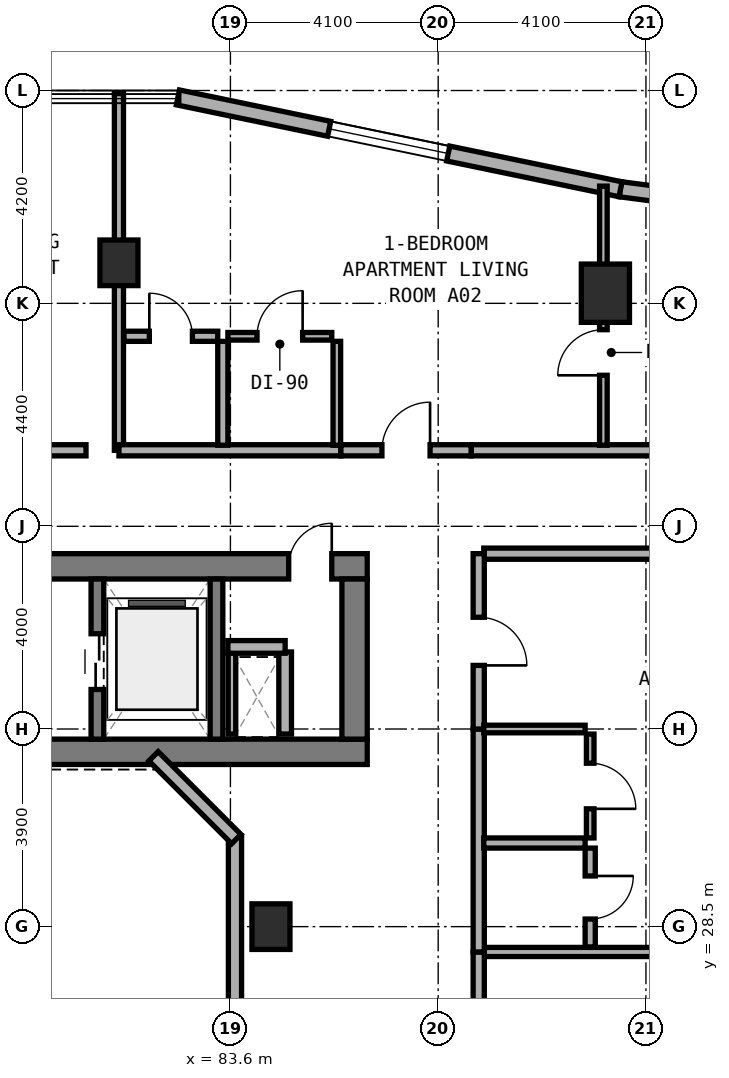
"""IFC4 building model, lengths in metres.
Left out: names, types, materials, properties, quantities, classifications, styles, units other than length and angle.
Written with IfcOpenShell. Run it as: python <this file> out.ifc"""

import sys

from ifc_helpers import new_model, si_unit, direction, frame, frame_2d, origin, origin_2d, place, context, subcontext, project, spatial, rectangle, extrude, element, fill, save


model = new_model("IFC4")
c1 = context("Model", 3, precision=1e-05, world=origin(), true_north=direction((0.0, 1.0)))
c2 = subcontext(c1, "Body", "Model", "MODEL_VIEW")
j1 = project(units=[si_unit("LENGTHUNIT", "METRE"), si_unit("PLANEANGLEUNIT", "RADIAN")], contexts=[c1])
p1 = place(None, origin())
s1 = spatial("IfcSite", under=j1, at=p1, CompositionType="ELEMENT")
p2 = place(p1, origin())
s2 = spatial("IfcBuilding", under=s1, at=p2, CompositionType="ELEMENT")
p3 = place(p2, frame((0.0, 0.0, 62.5)))
s3 = spatial("IfcBuildingStorey", under=s2, at=p3, CompositionType="ELEMENT", Elevation=62.5)
p4 = place(p3, frame((67.9, 31.95, 0.0), z_axis=(0.0, 0.0, 1.0), x_axis=(1.0, 0.0, 0.0)))
e1 = element("IfcWall", 1, at=p4, inside=s3, PredefinedType="SHEAR", context=c2, shape_type="SweptSolid", body=[
    extrude(rectangle(XDim=18.4, YDim=0.5, at=frame_2d((9.2, 0.0))), origin(), (0.0, 0.0, 1.0), 3.5),
])
p5 = place(p3, frame((67.9, 35.61, 0.0), z_axis=(0.0, 0.0, 1.0), x_axis=(1.0, 0.0, 0.0)))
e2 = element("IfcWall", 2, at=p5, inside=s3, PredefinedType="SHEAR", context=c2, shape_type="SweptSolid", body=[
    extrude(rectangle(XDim=18.4, YDim=0.5, at=frame_2d((9.2, 0.0))), origin(), (0.0, 0.0, 1.0), 3.5),
])
p6 = place(p5, frame((9.25, 0.0, 0.0)))
e3 = element("IfcOpeningElement", 3, at=p6, cuts=e2, PredefinedType="OPENING", context=c2, shape_type="SweptSolid", body=[
    extrude(rectangle(XDim=1.2, YDim=2.15, at=frame_2d((0.6, 1.075))), frame((0.0, 0.26, 0.0), z_axis=(0.0, -1.0, 0.0), x_axis=(1.0, 0.0, 0.0)), (0.0, 0.0, 1.0), 0.52),
])
p7 = place(p5, frame((16.85, 0.0, 0.0)))
e4 = element("IfcOpeningElement", 4, at=p7, cuts=e2, PredefinedType="OPENING", context=c2, shape_type="SweptSolid", body=[
    extrude(rectangle(XDim=0.85, YDim=2.1, at=frame_2d((0.425, 1.05))), frame((0.0, 0.26, 0.0), z_axis=(0.0, -1.0, 0.0), x_axis=(1.0, 0.0, 0.0)), (0.0, 0.0, 1.0), 0.52),
])
p8 = place(p3, frame((86.05, 32.2, 0.0), z_axis=(0.0, 0.0, 1.0), x_axis=(0.0, 1.0, 0.0)))
e5 = element("IfcWall", 5, at=p8, inside=s3, PredefinedType="SHEAR", context=c2, shape_type="SweptSolid", body=[
    extrude(rectangle(XDim=3.16, YDim=0.5, at=frame_2d((1.58, 0.0))), origin(), (0.0, 0.0, 1.0), 3.5),
])
p9 = place(p3, frame((80.975, 32.2, 0.0), z_axis=(0.0, 0.0, 1.0), x_axis=(0.0, 1.0, 0.0)))
e6 = element("IfcWall", 6, at=p9, inside=s3, PredefinedType="STANDARD", context=c2, shape_type="SweptSolid", body=[
    extrude(rectangle(XDim=3.16, YDim=0.25, at=frame_2d((1.58, 0.0))), origin(), (0.0, 0.0, 1.0), 3.25),
])
p10 = place(p9, frame((0.98, 0.0, 0.0)))
e7 = element("IfcOpeningElement", 7, at=p10, cuts=e6, PredefinedType="OPENING", context=c2, shape_type="SweptSolid", body=[
    extrude(rectangle(XDim=1.1, YDim=2.15, at=frame_2d((0.55, 1.075))), frame((0.0, 0.135, 0.0), z_axis=(0.0, -1.0, 0.0), x_axis=(1.0, 0.0, 0.0)), (0.0, 0.0, 1.0), 0.27),
])
p11 = place(p3, frame((83.325, 32.2, 0.0), z_axis=(0.0, 0.0, 1.0), x_axis=(0.0, 1.0, 0.0)))
e8 = element("IfcWall", 8, at=p11, inside=s3, PredefinedType="STANDARD", context=c2, shape_type="SweptSolid", body=[
    extrude(rectangle(XDim=3.16, YDim=0.25, at=frame_2d((1.58, 0.0))), origin(), (0.0, 0.0, 1.0), 3.25),
])
p12 = place(p3, frame((81.4, 41.6, 0.0), z_axis=(0.0, 0.0, 1.0), x_axis=(1.0, 0.0, 0.0)))
e9 = element("IfcColumn", 9, at=p12, inside=s3, PredefinedType="COLUMN", context=c2, shape_type="SweptSolid", body=[
    extrude(rectangle(XDim=0.75, YDim=0.9, at=origin_2d()), origin(), (0.0, 0.0, 1.0), 3.5),
])
p13 = place(p3, frame((91.0, 41.0, 0.0), z_axis=(0.0, 0.0, 1.0), x_axis=(1.0, 0.0, 0.0)))
e10 = element("IfcColumn", 10, at=p13, inside=s3, PredefinedType="COLUMN", context=c2, shape_type="SweptSolid", body=[
    extrude(rectangle(XDim=0.95, YDim=1.15, at=origin_2d()), origin(), (0.0, 0.0, 1.0), 3.5),
])
p14 = place(p3, frame((84.4, 28.5, 0.0), z_axis=(0.0, 0.0, 1.0), x_axis=(1.0, 0.0, 0.0)))
e11 = element("IfcColumn", 11, at=p14, inside=s3, PredefinedType="COLUMN", context=c2, shape_type="SweptSolid", body=[
    extrude(rectangle(XDim=0.75, YDim=0.9, at=origin_2d()), origin(), (0.0, 0.0, 1.0), 3.5),
])
p15 = place(p3, frame((92.051, 42.953, 0.0), z_axis=(0.0, 0.0, 1.0), x_axis=(-0.991559404866, 0.129653178221, 0.0)))
e12 = element("IfcWall", 12, at=p15, inside=s3, PredefinedType="STANDARD", context=c2, shape_type="SweptSolid", body=[
    extrude(rectangle(XDim=0.764, YDim=0.3, at=frame_2d((0.382, 0.0))), origin(), (0.0, 0.0, 1.0), 3.25),
])
p16 = place(p3, frame((91.298, 43.051, 0.0), z_axis=(0.0, 0.0, 1.0), x_axis=(-0.979128391325, 0.203242695569, 0.0)))
e13 = element("IfcWall", 13, at=p16, inside=s3, PredefinedType="STANDARD", context=c2, shape_type="SweptSolid", body=[
    extrude(rectangle(XDim=8.92, YDim=0.3, at=frame_2d((4.46, 0.0))), origin(), (0.0, 0.0, 1.0), 3.25),
])
p17 = place(p16, frame((3.472, 0.0, 0.8)))
e14 = element("IfcOpeningElement", 14, at=p17, cuts=e13, PredefinedType="OPENING", context=c2, shape_type="SweptSolid", body=[
    extrude(rectangle(XDim=2.4, YDim=1.6, at=frame_2d((1.2, 0.8))), frame((0.0, 0.16, 0.0), z_axis=(0.0, -1.0, 0.0), x_axis=(1.0, 0.0, 0.0)), (0.0, 0.0, 1.0), 0.32),
])
p18 = place(p3, frame((83.69, 19.71, 0.0), z_axis=(0.0, 0.0, 1.0), x_axis=(0.0, 1.0, 0.0)))
e15 = element("IfcWall", 15, at=p18, inside=s3, PredefinedType="STANDARD", context=c2, shape_type="SweptSolid", body=[
    extrude(rectangle(XDim=10.58, YDim=0.26, at=frame_2d((5.29, 0.0))), origin(), (0.0, 0.0, 1.0), 3.25),
])
p19 = place(p18, frame((4.39, 0.0, 0.85)))
e16 = element("IfcOpeningElement", 16, at=p19, cuts=e15, PredefinedType="OPENING", context=c2, shape_type="SweptSolid", body=[
    extrude(rectangle(XDim=1.8, YDim=1.5, at=frame_2d((0.9, 0.75))), frame((0.0, 0.14, 0.0), z_axis=(0.0, -1.0, 0.0), x_axis=(1.0, 0.0, 0.0)), (0.0, 0.0, 1.0), 0.28),
])
p20 = place(p3, frame((83.716, 30.228, 0.0), z_axis=(0.0, 0.0, 1.0), x_axis=(-0.707106781187, 0.707106781187, 0.0)))
e17 = element("IfcWall", 17, at=p20, inside=s3, PredefinedType="STANDARD", context=c2, shape_type="SweptSolid", body=[
    extrude(rectangle(XDim=2.311, YDim=0.26, at=frame_2d((1.155, 0.0))), origin(), (0.0, 0.0, 1.0), 3.25),
])
p21 = place(p3, frame((83.63, 32.3, 0.0), z_axis=(0.0, 0.0, 1.0), x_axis=(0.0, 1.0, 0.0)))
e18 = element("IfcWall", 18, at=p21, inside=s3, PredefinedType="PARTITIONING", context=c2, shape_type="SweptSolid", body=[
    extrude(rectangle(XDim=1.62, YDim=0.15, at=frame_2d((0.81, 0.0))), origin(), (0.0, 0.0, 1.0), 2.725),
])
p22 = place(p3, frame((84.68, 32.3, 0.0), z_axis=(0.0, 0.0, 1.0), x_axis=(0.0, 1.0, 0.0)))
e19 = element("IfcWall", 19, at=p22, inside=s3, PredefinedType="SOLIDWALL", context=c2, shape_type="SweptSolid", body=[
    extrude(rectangle(XDim=1.62, YDim=0.25, at=frame_2d((0.81, 0.0))), origin(), (0.0, 0.0, 1.0), 3.22),
])
p23 = place(p3, frame((83.55, 34.02, 0.0), z_axis=(0.0, 0.0, 1.0), x_axis=(1.0, 0.0, 0.0)))
e20 = element("IfcWall", 20, at=p23, inside=s3, PredefinedType="SOLIDWALL", context=c2, shape_type="SweptSolid", body=[
    extrude(rectangle(XDim=1.13, YDim=0.25, at=frame_2d((0.565, 0.0))), origin(), (0.0, 0.0, 1.0), 3.22),
])
p24 = place(p3, frame((77.45, 37.9, 0.0), z_axis=(0.0, 0.0, 1.0), x_axis=(1.0, 0.0, 0.0)))
e21 = element("IfcWall", 21, at=p24, inside=s3, PredefinedType="SOLIDWALL", context=c2, shape_type="SweptSolid", body=[
    extrude(rectangle(XDim=3.3, YDim=0.22, at=frame_2d((1.65, 0.0))), origin(), (0.0, 0.0, 1.0), 3.22),
])
p25 = place(p24, frame((0.98, 0.0, 0.0)))
e22 = element("IfcOpeningElement", 22, at=p25, cuts=e21, PredefinedType="OPENING", context=c2, shape_type="SweptSolid", body=[
    extrude(rectangle(XDim=1.1, YDim=2.1, at=frame_2d((0.55, 1.05))), frame((0.0, 0.12, 0.0), z_axis=(0.0, -1.0, 0.0), x_axis=(1.0, 0.0, 0.0)), (0.0, 0.0, 1.0), 0.24),
])
p26 = place(p3, frame((81.4, 37.9, 0.0), z_axis=(0.0, 0.0, 1.0), x_axis=(0.0, 1.0, 0.0)))
e23 = element("IfcWall", 23, at=p26, inside=s3, PredefinedType="SOLIDWALL", context=c2, shape_type="SweptSolid", body=[
    extrude(rectangle(XDim=7.04, YDim=0.18, at=frame_2d((3.52, 0.0))), origin(), (0.0, 0.0, 1.0), 2.725),
])
p27 = place(p3, frame((81.4, 37.9, 0.0), z_axis=(0.0, 0.0, 1.0), x_axis=(1.0, 0.0, 0.0)))
e24 = element("IfcWall", 24, at=p27, inside=s3, PredefinedType="SOLIDWALL", context=c2, shape_type="SweptSolid", body=[
    extrude(rectangle(XDim=4.38, YDim=0.22, at=frame_2d((2.19, 0.0))), origin(), (0.0, 0.0, 1.0), 2.725),
])
p28 = place(p3, frame((88.35, 37.9, 0.0), z_axis=(0.0, 0.0, 1.0), x_axis=(1.0, 0.0, 0.0)))
e25 = element("IfcWall", 25, at=p28, inside=s3, PredefinedType="SOLIDWALL", context=c2, shape_type="SweptSolid", body=[
    extrude(rectangle(XDim=7.41, YDim=0.22, at=frame_2d((3.705, 0.0))), origin(), (0.0, 0.0, 1.0), 2.865),
])
p29 = place(p3, frame((85.78, 37.9, 0.0), z_axis=(0.0, 0.0, 1.0), x_axis=(1.0, 0.0, 0.0)))
e26 = element("IfcWall", 26, at=p29, inside=s3, PredefinedType="SOLIDWALL", context=c2, shape_type="SweptSolid", body=[
    extrude(rectangle(XDim=2.57, YDim=0.22, at=frame_2d((1.285, 0.0))), origin(), (0.0, 0.0, 1.0), 3.22),
])
p30 = place(p29, frame((0.81, 0.0, 0.0)))
e27 = element("IfcOpeningElement", 27, at=p30, cuts=e26, PredefinedType="OPENING", context=c2, shape_type="SweptSolid", body=[
    extrude(rectangle(XDim=0.95, YDim=2.1, at=frame_2d((0.475, 1.05))), frame((0.0, 0.12, 0.0), z_axis=(0.0, -1.0, 0.0), x_axis=(1.0, 0.0, 0.0)), (0.0, 0.0, 1.0), 0.24),
])
p31 = place(p3, frame((90.96, 38.0, 0.0), z_axis=(0.0, 0.0, 1.0), x_axis=(0.0, 1.0, 0.0)))
e28 = element("IfcWall", 28, at=p31, inside=s3, PredefinedType="PARTITIONING", context=c2, shape_type="SweptSolid", body=[
    extrude(rectangle(XDim=5.113, YDim=0.15, at=frame_2d((2.557, 0.0))), origin(), (0.0, 0.0, 1.0), 2.865),
])
p32 = place(p31, frame((1.38, 0.0, 0.0)))
e29 = element("IfcOpeningElement", 29, at=p32, cuts=e28, PredefinedType="OPENING", context=c2, shape_type="SweptSolid", body=[
    extrude(rectangle(XDim=0.9, YDim=2.1, at=frame_2d((0.45, 1.05))), frame((0.0, 0.085, 0.0), z_axis=(0.0, -1.0, 0.0), x_axis=(1.0, 0.0, 0.0)), (0.0, 0.0, 1.0), 0.17),
])
p33 = place(p3, frame((83.45, 38.0, 0.0), z_axis=(0.0, 0.0, 1.0), x_axis=(0.0, 1.0, 0.0)))
e30 = element("IfcWall", 30, at=p33, inside=s3, PredefinedType="PLUMBINGWALL", context=c2, shape_type="SweptSolid", body=[
    extrude(rectangle(XDim=2.05, YDim=0.2, at=frame_2d((1.025, 0.0))), origin(), (0.0, 0.0, 1.0), 3.22),
])
p34 = place(p3, frame((85.7, 38.0, 0.0), z_axis=(0.0, 0.0, 1.0), x_axis=(0.0, 1.0, 0.0)))
e31 = element("IfcWall", 31, at=p34, inside=s3, PredefinedType="PARTITIONING", context=c2, shape_type="SweptSolid", body=[
    extrude(rectangle(XDim=2.05, YDim=0.15, at=frame_2d((1.025, 0.0))), origin(), (0.0, 0.0, 1.0), 3.22),
])
p35 = place(p3, frame((81.5, 40.15, 0.0), z_axis=(0.0, 0.0, 1.0), x_axis=(1.0, 0.0, 0.0)))
e32 = element("IfcWall", 32, at=p35, inside=s3, PredefinedType="PLUMBINGWALL", context=c2, shape_type="SweptSolid", body=[
    extrude(rectangle(XDim=1.85, YDim=0.2, at=frame_2d((0.925, 0.0))), origin(), (0.0, 0.0, 1.0), 2.725),
])
p36 = place(p35, frame((0.5, 0.0, 0.0)))
e33 = element("IfcOpeningElement", 33, at=p36, cuts=e32, PredefinedType="OPENING", context=c2, shape_type="SweptSolid", body=[
    extrude(rectangle(XDim=0.85, YDim=2.1, at=frame_2d((0.425, 1.05))), frame((0.0, 0.11, 0.0), z_axis=(0.0, -1.0, 0.0), x_axis=(1.0, 0.0, 0.0)), (0.0, 0.0, 1.0), 0.22),
])
p37 = place(p3, frame((83.55, 40.15, 0.0), z_axis=(0.0, 0.0, 1.0), x_axis=(1.0, 0.0, 0.0)))
e34 = element("IfcWall", 34, at=p37, inside=s3, PredefinedType="PARTITIONING", context=c2, shape_type="SweptSolid", body=[
    extrude(rectangle(XDim=2.05, YDim=0.15, at=frame_2d((1.025, 0.0))), origin(), (0.0, 0.0, 1.0), 3.22),
])
p38 = place(p37, frame((0.575, 0.0, 0.0)))
e35 = element("IfcOpeningElement", 35, at=p38, cuts=e34, PredefinedType="OPENING", context=c2, shape_type="SweptSolid", body=[
    extrude(rectangle(XDim=0.9, YDim=2.1, at=frame_2d((0.45, 1.05))), frame((0.0, 0.085, 0.0), z_axis=(0.0, -1.0, 0.0), x_axis=(1.0, 0.0, 0.0)), (0.0, 0.0, 1.0), 0.17),
])
p39 = place(p3, frame((88.6, 35.86, 0.0), z_axis=(0.0, 0.0, 1.0), x_axis=(1.0, 0.0, 0.0)))
e36 = element("IfcWall", 36, at=p39, inside=s3, PredefinedType="SOLIDWALL", context=c2, shape_type="SweptSolid", body=[
    extrude(rectangle(XDim=7.0, YDim=0.22, at=frame_2d((3.5, 0.0))), origin(), (0.0, 0.0, 1.0), 2.865),
])
p40 = place(p3, frame((88.5, 28.0, 0.0), z_axis=(0.0, 0.0, 1.0), x_axis=(1.0, 0.0, 0.0)))
e37 = element("IfcWall", 37, at=p40, inside=s3, PredefinedType="SOLIDWALL", context=c2, shape_type="SweptSolid", body=[
    extrude(rectangle(XDim=7.36, YDim=0.18, at=frame_2d((3.68, 0.0))), origin(), (0.0, 0.0, 1.0), 2.865),
])
p41 = place(p3, frame((88.5, 18.54, 0.0), z_axis=(0.0, 0.0, 1.0), x_axis=(0.0, 1.0, 0.0)))
e38 = element("IfcWall", 38, at=p41, inside=s3, PredefinedType="SOLIDWALL", context=c2, shape_type="SweptSolid", body=[
    extrude(rectangle(XDim=9.46, YDim=0.22, at=frame_2d((4.73, 0.0))), origin(), (0.0, 0.0, 1.0), 2.725),
])
p42 = place(p41, frame((2.355, 0.0, 0.0)))
e39 = element("IfcOpeningElement", 39, at=p42, cuts=e38, PredefinedType="OPENING", context=c2, shape_type="SweptSolid", body=[
    extrude(rectangle(XDim=0.95, YDim=2.1, at=frame_2d((0.475, 1.05))), frame((0.0, 0.12, 0.0), z_axis=(0.0, -1.0, 0.0), x_axis=(1.0, 0.0, 0.0)), (0.0, 0.0, 1.0), 0.24),
])
p43 = place(p3, frame((88.5, 28.0, 0.0), z_axis=(0.0, 0.0, 1.0), x_axis=(0.0, 1.0, 0.0)))
e40 = element("IfcWall", 40, at=p43, inside=s3, PredefinedType="SOLIDWALL", context=c2, shape_type="SweptSolid", body=[
    extrude(rectangle(XDim=4.4, YDim=0.22, at=frame_2d((2.2, 0.0))), origin(), (0.0, 0.0, 1.0), 2.725),
])
p44 = place(p3, frame((88.5, 32.4, 0.0), z_axis=(0.0, 0.0, 1.0), x_axis=(0.0, 1.0, 0.0)))
e41 = element("IfcWall", 41, at=p44, inside=s3, PredefinedType="SOLIDWALL", context=c2, shape_type="SweptSolid", body=[
    extrude(rectangle(XDim=3.46, YDim=0.22, at=frame_2d((1.73, 0.0))), origin(), (0.0, 0.0, 1.0), 3.22),
])
p45 = place(p44, frame((1.255, 0.0, 0.0)))
e42 = element("IfcOpeningElement", 42, at=p45, cuts=e41, PredefinedType="OPENING", context=c2, shape_type="SweptSolid", body=[
    extrude(rectangle(XDim=0.95, YDim=2.1, at=frame_2d((0.475, 1.05))), frame((0.0, 0.12, 0.0), z_axis=(0.0, -1.0, 0.0), x_axis=(1.0, 0.0, 0.0)), (0.0, 0.0, 1.0), 0.24),
])
p46 = place(p3, frame((88.6, 30.15, 0.0), z_axis=(0.0, 0.0, 1.0), x_axis=(1.0, 0.0, 0.0)))
e43 = element("IfcWall", 43, at=p46, inside=s3, PredefinedType="PLUMBINGWALL", context=c2, shape_type="SweptSolid", body=[
    extrude(rectangle(XDim=2.0, YDim=0.2, at=frame_2d((1.0, 0.0))), origin(), (0.0, 0.0, 1.0), 3.22),
])
p47 = place(p3, frame((88.6, 32.4, 0.0), z_axis=(0.0, 0.0, 1.0), x_axis=(1.0, 0.0, 0.0)))
e44 = element("IfcWall", 44, at=p47, inside=s3, PredefinedType="PARTITIONING", context=c2, shape_type="SweptSolid", body=[
    extrude(rectangle(XDim=2.0, YDim=0.15, at=frame_2d((1.0, 0.0))), origin(), (0.0, 0.0, 1.0), 3.22),
])
p48 = place(p3, frame((90.7, 28.1, 0.0), z_axis=(0.0, 0.0, 1.0), x_axis=(0.0, 1.0, 0.0)))
e45 = element("IfcWall", 45, at=p48, inside=s3, PredefinedType="PLUMBINGWALL", context=c2, shape_type="SweptSolid", body=[
    extrude(rectangle(XDim=1.95, YDim=0.2, at=frame_2d((0.975, 0.0))), origin(), (0.0, 0.0, 1.0), 2.725),
])
p49 = place(p48, frame((0.55, 0.0, 0.0)))
e46 = element("IfcOpeningElement", 46, at=p49, cuts=e45, PredefinedType="OPENING", context=c2, shape_type="SweptSolid", body=[
    extrude(rectangle(XDim=0.85, YDim=2.1, at=frame_2d((0.425, 1.05))), frame((0.0, 0.11, 0.0), z_axis=(0.0, -1.0, 0.0), x_axis=(1.0, 0.0, 0.0)), (0.0, 0.0, 1.0), 0.22),
])
p50 = place(p3, frame((90.7, 30.25, 0.0), z_axis=(0.0, 0.0, 1.0), x_axis=(0.0, 1.0, 0.0)))
e47 = element("IfcWall", 47, at=p50, inside=s3, PredefinedType="PARTITIONING", context=c2, shape_type="SweptSolid", body=[
    extrude(rectangle(XDim=2.05, YDim=0.15, at=frame_2d((1.025, 0.0))), origin(), (0.0, 0.0, 1.0), 3.22),
])
p51 = place(p50, frame((0.575, 0.0, 0.0)))
e48 = element("IfcOpeningElement", 48, at=p51, cuts=e47, PredefinedType="OPENING", context=c2, shape_type="SweptSolid", body=[
    extrude(rectangle(XDim=0.9, YDim=2.1, at=frame_2d((0.45, 1.05))), frame((0.0, 0.085, 0.0), z_axis=(0.0, -1.0, 0.0), x_axis=(1.0, 0.0, 0.0)), (0.0, 0.0, 1.0), 0.17),
])
p52 = place(p17, origin())
e49 = element("IfcWindow", 49, at=p52, inside=s3, PartitioningType="SINGLE_PANEL", PredefinedType="WINDOW", context=c2, shape_type="SweptSolid", body=[
    extrude(rectangle(XDim=2.4, YDim=1.6, at=frame_2d((1.2, 0.8))), frame((0.0, 0.03, 0.0), z_axis=(0.0, -1.0, 0.0), x_axis=(1.0, 0.0, 0.0)), (0.0, 0.0, 1.0), 0.06),
])
fill(e14, e49)
p53 = place(p10, origin())
e50 = element("IfcDoor", 50, at=p53, inside=s3, OperationType="DOUBLE_DOOR_SLIDING", PredefinedType="DOOR", context=c2, shape_type="SweptSolid", body=[
    extrude(rectangle(XDim=1.1, YDim=2.15, at=frame_2d((0.55, 1.075))), frame((0.0, 0.025, 0.0), z_axis=(0.0, -1.0, 0.0), x_axis=(1.0, 0.0, 0.0)), (0.0, 0.0, 1.0), 0.05),
])
fill(e7, e50)
p54 = place(p7, origin())
e51 = element("IfcDoor", 51, at=p54, inside=s3, OperationType="SINGLE_SWING_RIGHT", PredefinedType="DOOR", context=c2, shape_type="SweptSolid", body=[
    extrude(rectangle(XDim=0.85, YDim=2.1, at=frame_2d((0.425, 1.05))), frame((0.0, 0.025, 0.0), z_axis=(0.0, -1.0, 0.0), x_axis=(1.0, 0.0, 0.0)), (0.0, 0.0, 1.0), 0.05),
])
fill(e4, e51)
p55 = place(p30, origin())
e52 = element("IfcDoor", 52, at=p55, inside=s3, OperationType="SINGLE_SWING_RIGHT", PredefinedType="DOOR", context=c2, shape_type="SweptSolid", body=[
    extrude(rectangle(XDim=0.95, YDim=2.1, at=frame_2d((0.475, 1.05))), frame((0.0, 0.025, 0.0), z_axis=(0.0, -1.0, 0.0), x_axis=(1.0, 0.0, 0.0)), (0.0, 0.0, 1.0), 0.05),
])
fill(e27, e52)
p56 = place(p32, origin())
e53 = element("IfcDoor", 53, at=p56, inside=s3, OperationType="SINGLE_SWING_LEFT", PredefinedType="DOOR", context=c2, shape_type="SweptSolid", body=[
    extrude(rectangle(XDim=0.9, YDim=2.1, at=frame_2d((0.45, 1.05))), frame((0.0, 0.025, 0.0), z_axis=(0.0, -1.0, 0.0), x_axis=(1.0, 0.0, 0.0)), (0.0, 0.0, 1.0), 0.05),
])
fill(e29, e53)
p57 = place(p36, origin())
e54 = element("IfcDoor", 54, at=p57, inside=s3, OperationType="SINGLE_SWING_LEFT", PredefinedType="DOOR", context=c2, shape_type="SweptSolid", body=[
    extrude(rectangle(XDim=0.85, YDim=2.1, at=frame_2d((0.425, 1.05))), frame((0.0, 0.025, 0.0), z_axis=(0.0, -1.0, 0.0), x_axis=(1.0, 0.0, 0.0)), (0.0, 0.0, 1.0), 0.05),
])
fill(e33, e54)
p58 = place(p38, origin())
e55 = element("IfcDoor", 55, at=p58, inside=s3, OperationType="SINGLE_SWING_RIGHT", PredefinedType="DOOR", context=c2, shape_type="SweptSolid", body=[
    extrude(rectangle(XDim=0.9, YDim=2.1, at=frame_2d((0.45, 1.05))), frame((0.0, 0.025, 0.0), z_axis=(0.0, -1.0, 0.0), x_axis=(1.0, 0.0, 0.0)), (0.0, 0.0, 1.0), 0.05),
])
fill(e35, e55)
p59 = place(p45, frame((0.95, 0.0, 0.0), z_axis=(0.0, 0.0, 1.0), x_axis=(-1.0, 0.0, 0.0)))
e56 = element("IfcDoor", 56, at=p59, inside=s3, OperationType="SINGLE_SWING_RIGHT", PredefinedType="DOOR", context=c2, shape_type="SweptSolid", body=[
    extrude(rectangle(XDim=0.95, YDim=2.1, at=frame_2d((0.475, 1.05))), frame((0.0, 0.025, 0.0), z_axis=(0.0, -1.0, 0.0), x_axis=(1.0, 0.0, 0.0)), (0.0, 0.0, 1.0), 0.05),
])
fill(e42, e56)
p60 = place(p49, frame((0.85, 0.0, 0.0), z_axis=(0.0, 0.0, 1.0), x_axis=(-1.0, 0.0, 0.0)))
e57 = element("IfcDoor", 57, at=p60, inside=s3, OperationType="SINGLE_SWING_LEFT", PredefinedType="DOOR", context=c2, shape_type="SweptSolid", body=[
    extrude(rectangle(XDim=0.85, YDim=2.1, at=frame_2d((0.425, 1.05))), frame((0.0, 0.025, 0.0), z_axis=(0.0, -1.0, 0.0), x_axis=(1.0, 0.0, 0.0)), (0.0, 0.0, 1.0), 0.05),
])
fill(e46, e57)
p61 = place(p51, frame((0.9, 0.0, 0.0), z_axis=(0.0, 0.0, 1.0), x_axis=(-1.0, 0.0, 0.0)))
e58 = element("IfcDoor", 58, at=p61, inside=s3, OperationType="SINGLE_SWING_RIGHT", PredefinedType="DOOR", context=c2, shape_type="SweptSolid", body=[
    extrude(rectangle(XDim=0.9, YDim=2.1, at=frame_2d((0.45, 1.05))), frame((0.0, 0.025, 0.0), z_axis=(0.0, -1.0, 0.0), x_axis=(1.0, 0.0, 0.0)), (0.0, 0.0, 1.0), 0.05),
])
fill(e48, e58)
save(model, sys.argv[1])
